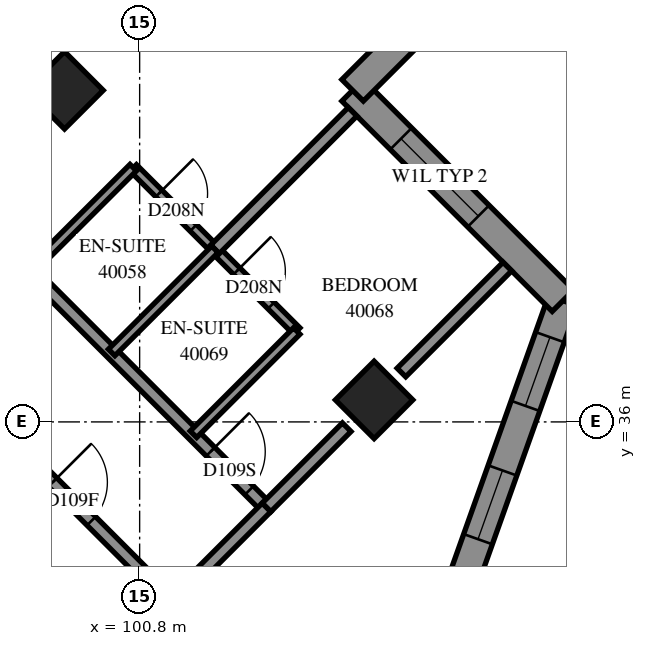
"""IFC4 building model, lengths in metres.
Left out: names, types, materials, properties, quantities, classifications, styles, units other than length and angle.
Written with IfcOpenShell. Run it as: python <this file> out.ifc"""

import sys

from ifc_helpers import new_model, si_unit, direction, frame, frame_2d, origin, origin_2d, place, context, subcontext, project, spatial, polyline, rectangle, outline, extrude, element, fill, save


model = new_model("IFC4")
c1 = context("Model", 3, precision=1e-05, world=origin(), true_north=direction((0.0, 1.0)))
c2 = subcontext(c1, "Body", "Model", "MODEL_VIEW")
j1 = project(units=[si_unit("LENGTHUNIT", "METRE"), si_unit("PLANEANGLEUNIT", "RADIAN")], contexts=[c1])
p1 = place(None, origin())
s1 = spatial("IfcSite", under=j1, at=p1, CompositionType="ELEMENT")
p2 = place(p1, origin())
s2 = spatial("IfcBuilding", under=s1, at=p2, CompositionType="ELEMENT")
p3 = place(p2, frame((0.0, 0.0, 149.0)))
s3 = spatial("IfcBuildingStorey", under=s2, at=p3, CompositionType="ELEMENT", Elevation=149.0)
for number, where, z_axis, x_axis in (
    (1, (99.565, 41.453, 0.0), (0.0, 0.0, 1.0), (0.707, -0.707, 0.0)),
    (2, (104.656, 36.362, 0.0), (0.0, 0.0, 1.0), (0.707, -0.707, 0.0)),
):
    element("IfcColumn", number, at=place(p3, frame(where, z_axis=z_axis, x_axis=x_axis)), inside=s3, PredefinedType="COLUMN", context=c2, shape_type="SweptSolid", body=[
        extrude(rectangle(XDim=0.9, YDim=0.9, at=origin_2d()), origin(), (0.0, 0.0, 1.0), 3.1),
    ])
p4 = place(p3, frame((105.975, 32.978, 0.0), z_axis=(0.0, 0.0, 1.0), x_axis=(0.3355165031, 0.9420343285, 0.0)))
e3 = element("IfcWall", 3, at=p4, inside=s3, PredefinedType="SOLIDWALL", context=c2, shape_type="SweptSolid", body=[
    extrude(outline(polyline([(-0.114, -0.25), (5.482, -0.25), (5.166, 0.25), (0.114, 0.25), (-0.114, -0.25)])), origin(), (0.0, 0.0, 1.0), 3.1),
])
p5 = place(p4, frame((1.161, 0.0, 0.45)))
e4 = element("IfcOpeningElement", 4, at=p5, cuts=e3, PredefinedType="OPENING", context=c2, shape_type="SweptSolid", body=[
    extrude(rectangle(XDim=1.2, YDim=2.5, at=frame_2d((0.6, 1.25))), frame((0.0, 0.26, 0.0), z_axis=(0.0, -1.0, 0.0), x_axis=(1.0, 0.0, 0.0)), (0.0, 0.0, 1.0), 0.52),
])
p6 = place(p4, frame((3.487, 0.0, 0.45)))
e5 = element("IfcOpeningElement", 5, at=p6, cuts=e3, PredefinedType="OPENING", context=c2, shape_type="SweptSolid", body=[
    extrude(rectangle(XDim=1.2, YDim=2.5, at=frame_2d((0.6, 1.25))), frame((0.0, 0.26, 0.0), z_axis=(0.0, -1.0, 0.0), x_axis=(1.0, 0.0, 0.0)), (0.0, 0.0, 1.0), 0.52),
])
p7 = place(p3, frame((107.761, 37.994, 0.0), z_axis=(0.0, 0.0, 1.0), x_axis=(-0.7071272222, 0.7070863396, 0.0)))
e6 = element("IfcWall", 6, at=p7, inside=s3, PredefinedType="SOLIDWALL", context=c2, shape_type="SweptSolid", body=[
    extrude(outline(polyline([(-0.158, -0.25), (4.642, -0.25), (5.142, 0.25), (0.158, 0.25), (-0.158, -0.25)])), origin(), (0.0, 0.0, 1.0), 3.1),
])
p8 = place(p7, frame((1.967, 0.0, 0.6)))
e7 = element("IfcOpeningElement", 7, at=p8, cuts=e6, PredefinedType="OPENING", context=c2, shape_type="SweptSolid", body=[
    extrude(rectangle(XDim=1.8, YDim=1.9, at=frame_2d((0.9, 0.95))), frame((0.0, 0.26, 0.0), z_axis=(0.0, -1.0, 0.0), x_axis=(1.0, 0.0, 0.0)), (0.0, 0.0, 1.0), 0.52),
])
p9 = place(p3, frame((104.302, 41.453, 0.0), z_axis=(0.0, 0.0, 1.0), x_axis=(0.7071242197, 0.7070893422, 0.0)))
e8 = element("IfcWall", 8, at=p9, inside=s3, PredefinedType="SOLIDWALL", context=c2, shape_type="SweptSolid", body=[
    extrude(outline(polyline([(0.25, -0.25), (6.071, -0.25), (5.397, 0.25), (-0.25, 0.25), (0.25, -0.25)])), origin(), (0.0, 0.0, 1.0), 3.1),
])
p10 = place(p9, frame((1.125, 0.0, 0.6)))
e9 = element("IfcOpeningElement", 9, at=p10, cuts=e8, PredefinedType="OPENING", context=c2, shape_type="SweptSolid", body=[
    extrude(rectangle(XDim=1.8, YDim=1.9, at=frame_2d((0.9, 0.95))), frame((0.0, 0.26, 0.0), z_axis=(0.0, -1.0, 0.0), x_axis=(1.0, 0.0, 0.0)), (0.0, 0.0, 1.0), 0.52),
])
p11 = place(p3, frame((94.189, 43.287, 0.0), z_axis=(0.0, 0.0, 1.0), x_axis=(0.7071067812, -0.7071067812, 0.0)))
e10 = element("IfcWall", 10, at=p11, inside=s3, PredefinedType="PARTITIONING", context=c2, shape_type="SweptSolid", body=[
    extrude(rectangle(XDim=12.298, YDim=0.2, at=frame_2d((6.149, 0.0))), origin(), (0.0, 0.0, 1.0), 3.1),
])
p12 = place(p11, frame((3.755, 0.0, 0.0)))
e11 = element("IfcOpeningElement", 11, at=p12, cuts=e10, PredefinedType="OPENING", context=c2, shape_type="SweptSolid", body=[
    extrude(rectangle(XDim=0.9, YDim=2.1, at=frame_2d((0.45, 1.05))), frame((0.0, 0.11, 0.0), z_axis=(0.0, -1.0, 0.0), x_axis=(1.0, 0.0, 0.0)), (0.0, 0.0, 1.0), 0.22),
])
p13 = place(p11, frame((10.998, 0.0, 0.0)))
e12 = element("IfcOpeningElement", 12, at=p13, cuts=e10, PredefinedType="OPENING", context=c2, shape_type="SweptSolid", body=[
    extrude(rectangle(XDim=0.9, YDim=2.1, at=frame_2d((0.45, 1.05))), frame((0.0, 0.11, 0.0), z_axis=(0.0, -1.0, 0.0), x_axis=(1.0, 0.0, 0.0)), (0.0, 0.0, 1.0), 0.22),
])
p14 = place(p3, frame((100.694, 40.178, 0.0), z_axis=(0.0, 0.0, 1.0), x_axis=(0.7076329021, -0.7065802685, 0.0)))
e13 = element("IfcWall", 13, at=p14, inside=s3, PredefinedType="PARTITIONING", context=c2, shape_type="SweptSolid", body=[
    extrude(rectangle(XDim=3.8, YDim=0.15, at=frame_2d((1.9, 0.0))), origin(), (0.0, 0.0, 1.0), 3.1),
])
p15 = place(p14, frame((0.598, 0.0, 0.0)))
e14 = element("IfcOpeningElement", 14, at=p15, cuts=e13, PredefinedType="OPENING", context=c2, shape_type="SweptSolid", body=[
    extrude(rectangle(XDim=0.8, YDim=2.1, at=frame_2d((0.4, 1.05))), frame((0.0, 0.085, 0.0), z_axis=(0.0, -1.0, 0.0), x_axis=(1.0, 0.0, 0.0)), (0.0, 0.0, 1.0), 0.17),
])
p16 = place(p14, frame((2.405, 0.0, 0.0)))
e15 = element("IfcOpeningElement", 15, at=p16, cuts=e13, PredefinedType="OPENING", context=c2, shape_type="SweptSolid", body=[
    extrude(rectangle(XDim=0.8, YDim=2.1, at=frame_2d((0.4, 1.05))), frame((0.0, 0.085, 0.0), z_axis=(0.0, -1.0, 0.0), x_axis=(1.0, 0.0, 0.0)), (0.0, 0.0, 1.0), 0.17),
])
p17 = place(p3, frame((102.04, 38.838, 0.0), z_axis=(0.0, 0.0, 1.0), x_axis=(0.7071067812, 0.7071067812, 0.0)))
e16 = element("IfcWall", 16, at=p17, inside=s3, PredefinedType="PARTITIONING", context=c2, shape_type="SweptSolid", body=[
    extrude(rectangle(XDim=3.199, YDim=0.2, at=frame_2d((1.599, 0.0))), origin(), (0.0, 0.0, 1.0), 3.1),
])
p18 = place(p3, frame((99.214, 35.162, 0.0), z_axis=(0.0, 0.0, 1.0), x_axis=(0.706773319, -0.7074400862, 0.0)))
e17 = element("IfcWall", 17, at=p18, inside=s3, PredefinedType="PARTITIONING", context=c2, shape_type="SweptSolid", body=[
    extrude(rectangle(XDim=2.999, YDim=0.2, at=frame_2d((1.5, 0.0))), origin(), (0.0, 0.0, 1.0), 3.1),
])
p19 = place(p18, frame((0.22, 0.0, 0.0)))
e18 = element("IfcOpeningElement", 18, at=p19, cuts=e17, PredefinedType="OPENING", context=c2, shape_type="SweptSolid", body=[
    extrude(rectangle(XDim=0.9, YDim=2.1, at=frame_2d((0.45, 1.05))), frame((0.0, 0.11, 0.0), z_axis=(0.0, -1.0, 0.0), x_axis=(1.0, 0.0, 0.0)), (0.0, 0.0, 1.0), 0.22),
])
p20 = place(p3, frame((105.105, 36.813, 0.0), z_axis=(0.0, 0.0, 1.0), x_axis=(0.7071067812, 0.7071067812, 0.0)))
e19 = element("IfcWall", 19, at=p20, inside=s3, PredefinedType="PARTITIONING", context=c2, shape_type="SweptSolid", body=[
    extrude(rectangle(XDim=2.463, YDim=0.2, at=frame_2d((1.232, 0.0))), origin(), (0.0, 0.0, 1.0), 3.1),
])
p21 = place(p3, frame((101.685, 35.797, 0.0), z_axis=(0.0, 0.0, 1.0), x_axis=(0.7071067812, 0.7071067812, 0.0)))
e20 = element("IfcWall", 20, at=p21, inside=s3, PredefinedType="PARTITIONING", context=c2, shape_type="SweptSolid", body=[
    extrude(rectangle(XDim=2.401, YDim=0.15, at=frame_2d((1.201, 0.0))), origin(), (0.0, 0.0, 1.0), 3.1),
])
for number, where, z_axis, x_axis in (
    (21, (100.34, 37.142, 0.0), (0.0, 0.0, 1.0), (0.708, 0.707, 0.0)),
    (22, (98.996, 38.486, 0.0), (0.0, 0.0, 1.0), (0.708, 0.707, 0.0)),
):
    element("IfcWall", number, at=place(p3, frame(where, z_axis=z_axis, x_axis=x_axis)), inside=s3, PredefinedType="PARTITIONING", context=c2, shape_type="SweptSolid", body=[
        extrude(rectangle(XDim=2.4, YDim=0.15, at=frame_2d((1.2, 0.0))), origin(), (0.0, 0.0, 1.0), 3.1),
    ])
p22 = place(p3, frame((101.331, 33.039, 0.0), z_axis=(0.0, 0.0, 1.0), x_axis=(0.7071067812, 0.7071067812, 0.0)))
e23 = element("IfcWall", 23, at=p22, inside=s3, PredefinedType="PARTITIONING", context=c2, shape_type="SweptSolid", body=[
    extrude(rectangle(XDim=2.2, YDim=0.2, at=frame_2d((1.1, 0.0))), origin(), (0.0, 0.0, 1.0), 2.6),
])
p23 = place(p3, frame((102.887, 34.595, 0.0), z_axis=(0.0, 0.0, 1.0), x_axis=(0.7071067812, 0.7071067812, 0.0)))
e24 = element("IfcWall", 24, at=p23, inside=s3, PredefinedType="PARTITIONING", context=c2, shape_type="SweptSolid", body=[
    extrude(rectangle(XDim=1.864, YDim=0.2, at=frame_2d((0.932, 0.0))), origin(), (0.0, 0.0, 1.0), 2.6),
])
p24 = place(p5, origin())
e25 = element("IfcWindow", 25, at=p24, inside=s3, PartitioningType="SINGLE_PANEL", PredefinedType="WINDOW", context=c2, shape_type="SweptSolid", body=[
    extrude(rectangle(XDim=1.2, YDim=2.5, at=frame_2d((0.6, 1.25))), frame((0.0, 0.18, 0.0), z_axis=(0.0, -1.0, 0.0), x_axis=(1.0, 0.0, 0.0)), (0.0, 0.0, 1.0), 0.06),
])
fill(e4, e25)
p25 = place(p6, origin())
e26 = element("IfcWindow", 26, at=p25, inside=s3, PartitioningType="SINGLE_PANEL", PredefinedType="WINDOW", context=c2, shape_type="SweptSolid", body=[
    extrude(rectangle(XDim=1.2, YDim=2.5, at=frame_2d((0.6, 1.25))), frame((0.0, 0.18, 0.0), z_axis=(0.0, -1.0, 0.0), x_axis=(1.0, 0.0, 0.0)), (0.0, 0.0, 1.0), 0.06),
])
fill(e5, e26)
p26 = place(p8, origin())
e27 = element("IfcWindow", 27, at=p26, inside=s3, PartitioningType="SINGLE_PANEL", PredefinedType="WINDOW", context=c2, shape_type="SweptSolid", body=[
    extrude(rectangle(XDim=1.8, YDim=1.9, at=frame_2d((0.9, 0.95))), frame((0.0, 0.18, 0.0), z_axis=(0.0, -1.0, 0.0), x_axis=(1.0, 0.0, 0.0)), (0.0, 0.0, 1.0), 0.06),
])
fill(e7, e27)
p27 = place(p15, origin())
e28 = element("IfcDoor", 28, at=p27, inside=s3, OperationType="SINGLE_SWING_RIGHT", PredefinedType="DOOR", context=c2, shape_type="SweptSolid", body=[
    extrude(rectangle(XDim=0.8, YDim=2.1, at=frame_2d((0.4, 1.05))), frame((0.0, 0.025, 0.0), z_axis=(0.0, -1.0, 0.0), x_axis=(1.0, 0.0, 0.0)), (0.0, 0.0, 1.0), 0.05),
])
fill(e14, e28)
p28 = place(p19, origin())
e29 = element("IfcDoor", 29, at=p28, inside=s3, OperationType="SINGLE_SWING_RIGHT", PredefinedType="DOOR", context=c2, shape_type="SweptSolid", body=[
    extrude(rectangle(XDim=0.9, YDim=2.1, at=frame_2d((0.45, 1.05))), frame((0.0, 0.025, 0.0), z_axis=(0.0, -1.0, 0.0), x_axis=(1.0, 0.0, 0.0)), (0.0, 0.0, 1.0), 0.05),
])
fill(e18, e29)
p29 = place(p13, origin())
e30 = element("IfcDoor", 30, at=p29, inside=s3, OperationType="SINGLE_SWING_RIGHT", PredefinedType="DOOR", context=c2, shape_type="SweptSolid", body=[
    extrude(rectangle(XDim=0.9, YDim=2.1, at=frame_2d((0.45, 1.05))), frame((0.0, 0.025, 0.0), z_axis=(0.0, -1.0, 0.0), x_axis=(1.0, 0.0, 0.0)), (0.0, 0.0, 1.0), 0.05),
])
fill(e12, e30)
p30 = place(p16, origin())
e31 = element("IfcDoor", 31, at=p30, inside=s3, OperationType="SINGLE_SWING_RIGHT", PredefinedType="DOOR", context=c2, shape_type="SweptSolid", body=[
    extrude(rectangle(XDim=0.8, YDim=2.1, at=frame_2d((0.4, 1.05))), frame((0.0, 0.025, 0.0), z_axis=(0.0, -1.0, 0.0), x_axis=(1.0, 0.0, 0.0)), (0.0, 0.0, 1.0), 0.05),
])
fill(e15, e31)
save(model, sys.argv[1])
